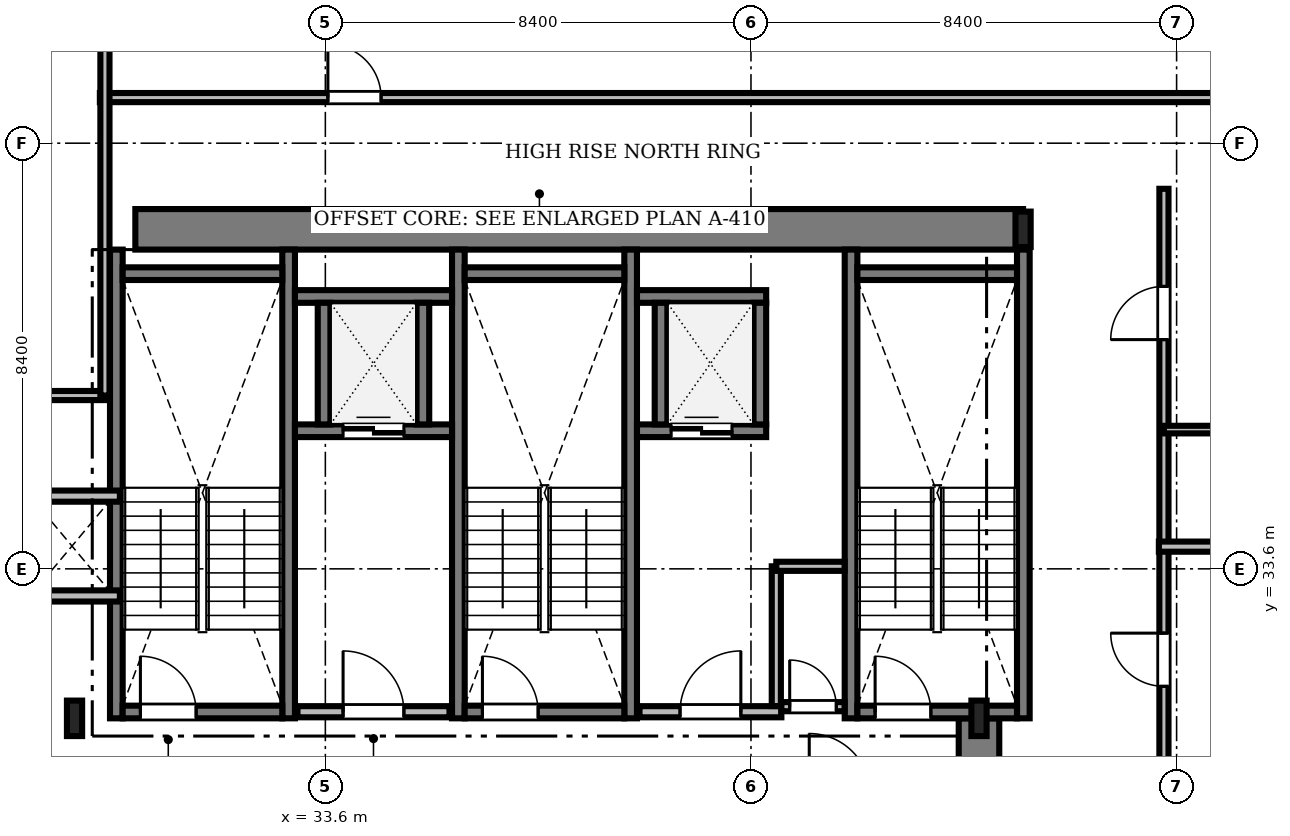
"""IFC4 building model, lengths in metres.
Left out: names, types, materials, properties, quantities, classifications, styles, units other than length and angle.
Written with IfcOpenShell. Run it as: python <this file> out.ifc"""

import sys

from ifc_helpers import new_model, si_unit, direction, frame, frame_2d, origin, origin_2d, place, context, subcontext, project, spatial, rectangle, i_section, extrude, source, transform, mapped, element, fill, save


model = new_model("IFC4")
c1 = context("Model", 3, precision=1e-05, world=origin(), true_north=direction((0.0, 1.0)))
c2 = subcontext(c1, "Body", "Model", "MODEL_VIEW")
j1 = project(units=[si_unit("LENGTHUNIT", "METRE"), si_unit("PLANEANGLEUNIT", "RADIAN")], contexts=[c1])
p1 = place(None, origin())
s1 = spatial("IfcSite", under=j1, at=p1, CompositionType="ELEMENT")
p2 = place(p1, origin())
s2 = spatial("IfcBuilding", under=s1, at=p2, CompositionType="ELEMENT")
p3 = place(p2, frame((0.0, 0.0, 177.2)))
s3 = spatial("IfcBuildingStorey", under=s2, at=p3, CompositionType="ELEMENT", Elevation=177.2)
m1 = source(origin(), c2, "Body", "SweptSolid", [
    extrude(rectangle(XDim=17.52, YDim=0.8, at=frame_2d((8.76, 0.0))), origin(), (0.0, 0.0, 1.0), 3.58),
])
p4 = place(p3, frame((29.85, 40.3, 0.0), z_axis=(0.0, 0.0, 1.0), x_axis=(1.0, 0.0, 0.0)))
e1 = element("IfcWall", 1, at=p4, inside=s3, PredefinedType="SHEAR", context=c2, shape_type="MappedRepresentation", body=[
    mapped(m1, transform((0.0, 0.0, 0.0), scale=1.0)),
])
m2 = source(origin(), c2, "Body", "SweptSolid", [
    extrude(rectangle(XDim=13.15, YDim=0.8, at=frame_2d((6.575, 0.0))), origin(), (0.0, 0.0, 1.0), 3.58),
])
p5 = place(p3, frame((46.5, 17.5, 0.0), z_axis=(0.0, 0.0, 1.0), x_axis=(0.0, 1.0, 0.0)))
e2 = element("IfcWall", 2, at=p5, inside=s3, PredefinedType="SHEAR", context=c2, shape_type="MappedRepresentation", body=[
    mapped(m2, transform((0.0, 0.0, 0.0), scale=1.0)),
])
m3 = source(origin(), c2, "Body", "SweptSolid", [
    extrude(i_section(OverallWidth=0.3, OverallDepth=0.7, WebThickness=0.017, FlangeThickness=0.032, FilletRadius=0.027, at=origin_2d()), origin(), (0.0, 0.0, 1.0), 3.58),
])
for number, where, z_axis, x_axis in (
    (3, (28.65, 30.65, 0.0), (0.0, 0.0, 1.0), (1.0, 0.0, 0.0)),
    (4, (46.5, 30.65, 0.0), (0.0, 0.0, 1.0), (1.0, 0.0, 0.0)),
    (5, (47.37, 40.3, 0.0), (0.0, 0.0, 1.0), (1.0, 0.0, 0.0)),
):
    element("IfcColumn", number, at=place(p3, frame(where, z_axis=z_axis, x_axis=x_axis)), inside=s3, PredefinedType="COLUMN", context=c2, shape_type="MappedRepresentation", body=[
        mapped(m3, transform((0.0, 0.0, 0.0), scale=1.0)),
    ])
m4 = source(origin(), c2, "Body", "SweptSolid", [
    extrude(rectangle(XDim=9.25, YDim=0.25, at=frame_2d((4.625, 0.0))), origin(), (0.0, 0.0, 1.0), 3.6),
])
for number, where, z_axis, x_axis in (
    (6, (29.475, 30.65, 0.0), (0.0, 0.0, 1.0), (0.0, 1.0, 0.0)),
    (7, (32.875, 30.65, 0.0), (0.0, 0.0, 1.0), (0.0, 1.0, 0.0)),
):
    element("IfcWall", number, at=place(p3, frame(where, z_axis=z_axis, x_axis=x_axis)), inside=s3, PredefinedType="SOLIDWALL", context=c2, shape_type="MappedRepresentation", body=[
        mapped(m4, transform((0.0, 0.0, 0.0), scale=1.0)),
    ])
m5 = source(origin(), c2, "Body", "SweptSolid", [
    extrude(rectangle(XDim=3.15, YDim=0.25, at=frame_2d((1.575, 0.0))), origin(), (0.0, 0.0, 1.0), 3.6),
])
p6 = place(p3, frame((29.6, 39.425, 0.0), z_axis=(0.0, 0.0, 1.0), x_axis=(1.0, 0.0, 0.0)))
e8 = element("IfcWall", 8, at=p6, inside=s3, PredefinedType="SOLIDWALL", context=c2, shape_type="MappedRepresentation", body=[
    mapped(m5, transform((0.0, 0.0, 0.0), scale=1.0)),
])
p7 = place(p3, frame((29.6, 30.775, 0.0), z_axis=(0.0, 0.0, 1.0), x_axis=(1.0, 0.0, 0.0)))
e9 = element("IfcWall", 9, at=p7, inside=s3, PredefinedType="SOLIDWALL", context=c2, shape_type="MappedRepresentation", body=[
    mapped(m5, transform((0.0, 0.0, 0.0), scale=1.0)),
])
m6 = source(origin(), c2, "Body", "SweptSolid", [
    extrude(rectangle(XDim=1.1, YDim=2.2, at=frame_2d((0.55, 1.1))), frame((0.0, 0.135, 0.0), z_axis=(0.0, -1.0, 0.0), x_axis=(1.0, 0.0, 0.0)), (0.0, 0.0, 1.0), 0.27),
])
p8 = place(p7, frame((0.35, 0.0, 0.0)))
e10 = element("IfcOpeningElement", 10, at=p8, cuts=e9, PredefinedType="OPENING", context=c2, shape_type="MappedRepresentation", body=[
    mapped(m6, transform((0.0, 0.0, 0.0), scale=1.0)),
])
for number, where, z_axis, x_axis in (
    (11, (36.225, 30.65, 0.0), (0.0, 0.0, 1.0), (0.0, 1.0, 0.0)),
    (12, (39.625, 30.65, 0.0), (0.0, 0.0, 1.0), (0.0, 1.0, 0.0)),
):
    element("IfcWall", number, at=place(p3, frame(where, z_axis=z_axis, x_axis=x_axis)), inside=s3, PredefinedType="SOLIDWALL", context=c2, shape_type="MappedRepresentation", body=[
        mapped(m4, transform((0.0, 0.0, 0.0), scale=1.0)),
    ])
p9 = place(p3, frame((36.35, 39.425, 0.0), z_axis=(0.0, 0.0, 1.0), x_axis=(1.0, 0.0, 0.0)))
e13 = element("IfcWall", 13, at=p9, inside=s3, PredefinedType="SOLIDWALL", context=c2, shape_type="MappedRepresentation", body=[
    mapped(m5, transform((0.0, 0.0, 0.0), scale=1.0)),
])
p10 = place(p3, frame((36.35, 30.775, 0.0), z_axis=(0.0, 0.0, 1.0), x_axis=(1.0, 0.0, 0.0)))
e14 = element("IfcWall", 14, at=p10, inside=s3, PredefinedType="SOLIDWALL", context=c2, shape_type="MappedRepresentation", body=[
    mapped(m5, transform((0.0, 0.0, 0.0), scale=1.0)),
])
p11 = place(p10, frame((0.35, 0.0, 0.0)))
e15 = element("IfcOpeningElement", 15, at=p11, cuts=e14, PredefinedType="OPENING", context=c2, shape_type="MappedRepresentation", body=[
    mapped(m6, transform((0.0, 0.0, 0.0), scale=1.0)),
])
for number, where, z_axis, x_axis in (
    (16, (43.975, 30.65, 0.0), (0.0, 0.0, 1.0), (0.0, 1.0, 0.0)),
    (17, (47.375, 30.65, 0.0), (0.0, 0.0, 1.0), (0.0, 1.0, 0.0)),
):
    element("IfcWall", number, at=place(p3, frame(where, z_axis=z_axis, x_axis=x_axis)), inside=s3, PredefinedType="SOLIDWALL", context=c2, shape_type="MappedRepresentation", body=[
        mapped(m4, transform((0.0, 0.0, 0.0), scale=1.0)),
    ])
p12 = place(p3, frame((44.1, 39.425, 0.0), z_axis=(0.0, 0.0, 1.0), x_axis=(1.0, 0.0, 0.0)))
e18 = element("IfcWall", 18, at=p12, inside=s3, PredefinedType="SOLIDWALL", context=c2, shape_type="MappedRepresentation", body=[
    mapped(m5, transform((0.0, 0.0, 0.0), scale=1.0)),
])
p13 = place(p3, frame((44.1, 30.775, 0.0), z_axis=(0.0, 0.0, 1.0), x_axis=(1.0, 0.0, 0.0)))
e19 = element("IfcWall", 19, at=p13, inside=s3, PredefinedType="SOLIDWALL", context=c2, shape_type="MappedRepresentation", body=[
    mapped(m5, transform((0.0, 0.0, 0.0), scale=1.0)),
])
p14 = place(p13, frame((0.35, 0.0, 0.0)))
e20 = element("IfcOpeningElement", 20, at=p14, cuts=e19, PredefinedType="OPENING", context=c2, shape_type="MappedRepresentation", body=[
    mapped(m6, transform((0.0, 0.0, 0.0), scale=1.0)),
])
m7 = source(origin(), c2, "Body", "SweptSolid", [
    extrude(rectangle(XDim=3.0, YDim=0.22, at=frame_2d((1.5, 0.0))), origin(), (0.0, 0.0, 1.0), 3.58),
])
p15 = place(p3, frame((33.05, 30.78, 0.0), z_axis=(0.0, 0.0, 1.0), x_axis=(1.0, 0.0, 0.0)))
e21 = element("IfcWall", 21, at=p15, inside=s3, PredefinedType="SOLIDWALL", context=c2, shape_type="MappedRepresentation", body=[
    mapped(m7, transform((0.0, 0.0, 0.0), scale=1.0)),
])
m8 = source(origin(), c2, "Body", "SweptSolid", [
    extrude(rectangle(XDim=1.2, YDim=2.2, at=frame_2d((0.6, 1.1))), frame((0.0, 0.12, 0.0), z_axis=(0.0, -1.0, 0.0), x_axis=(1.0, 0.0, 0.0)), (0.0, 0.0, 1.0), 0.24),
])
p16 = place(p15, frame((0.9, 0.0, 0.0)))
e22 = element("IfcOpeningElement", 22, at=p16, cuts=e21, PredefinedType="OPENING", context=c2, shape_type="MappedRepresentation", body=[
    mapped(m8, transform((0.0, 0.0, 0.0), scale=1.0)),
])
m9 = source(origin(), c2, "Body", "SweptSolid", [
    extrude(rectangle(XDim=2.8, YDim=0.22, at=frame_2d((1.4, 0.0))), origin(), (0.0, 0.0, 1.0), 3.58),
])
p17 = place(p3, frame((39.8, 30.78, 0.0), z_axis=(0.0, 0.0, 1.0), x_axis=(1.0, 0.0, 0.0)))
e23 = element("IfcWall", 23, at=p17, inside=s3, PredefinedType="SOLIDWALL", context=c2, shape_type="MappedRepresentation", body=[
    mapped(m9, transform((0.0, 0.0, 0.0), scale=1.0)),
])
p18 = place(p17, frame((0.8, 0.0, 0.0)))
e24 = element("IfcOpeningElement", 24, at=p18, cuts=e23, PredefinedType="OPENING", context=c2, shape_type="MappedRepresentation", body=[
    mapped(m8, transform((0.0, 0.0, 0.0), scale=1.0)),
])
m10 = source(origin(), c2, "Body", "SweptSolid", [
    extrude(rectangle(XDim=1.89, YDim=0.22, at=frame_2d((0.945, 0.0))), origin(), (0.0, 0.0, 1.0), 3.58),
])
for number, where, z_axis, x_axis in (
    (25, (27.655, 33.065, 0.0), (0.0, 0.0, 1.0), (1.0, 0.0, 0.0)),
    (26, (27.655, 35.035, 0.0), (0.0, 0.0, 1.0), (1.0, 0.0, 0.0)),
):
    element("IfcWall", number, at=place(p3, frame(where, z_axis=z_axis, x_axis=x_axis)), inside=s3, PredefinedType="SOLIDWALL", context=c2, shape_type="MappedRepresentation", body=[
        mapped(m10, transform((0.0, 0.0, 0.0), scale=1.0)),
    ])
m11 = source(origin(), c2, "Body", "SweptSolid", [
    extrude(rectangle(XDim=3.1, YDim=0.25, at=frame_2d((1.55, 0.0))), origin(), (0.0, 0.0, 1.0), 3.58),
])
p19 = place(p3, frame((33.0, 36.325, 0.0), z_axis=(0.0, 0.0, 1.0), x_axis=(1.0, 0.0, 0.0)))
e27 = element("IfcWall", 27, at=p19, inside=s3, PredefinedType="SOLIDWALL", context=c2, shape_type="MappedRepresentation", body=[
    mapped(m11, transform((0.0, 0.0, 0.0), scale=1.0)),
])
m12 = source(origin(), c2, "Body", "SweptSolid", [
    extrude(rectangle(XDim=1.2, YDim=2.25, at=frame_2d((0.6, 1.125))), frame((0.0, 0.135, 0.0), z_axis=(0.0, -1.0, 0.0), x_axis=(1.0, 0.0, 0.0)), (0.0, 0.0, 1.0), 0.27),
])
p20 = place(p19, frame((0.95, 0.0, 0.0)))
e28 = element("IfcOpeningElement", 28, at=p20, cuts=e27, PredefinedType="OPENING", context=c2, shape_type="MappedRepresentation", body=[
    mapped(m12, transform((0.0, 0.0, 0.0), scale=1.0)),
])
p21 = place(p3, frame((33.0, 38.975, 0.0), z_axis=(0.0, 0.0, 1.0), x_axis=(1.0, 0.0, 0.0)))
e29 = element("IfcWall", 29, at=p21, inside=s3, PredefinedType="SOLIDWALL", context=c2, shape_type="MappedRepresentation", body=[
    mapped(m11, transform((0.0, 0.0, 0.0), scale=1.0)),
])
m13 = source(origin(), c2, "Body", "SweptSolid", [
    extrude(rectangle(XDim=2.4, YDim=0.25, at=frame_2d((1.2, 0.0))), origin(), (0.0, 0.0, 1.0), 3.58),
])
for number, where, z_axis, x_axis in (
    (30, (33.575, 36.45, 0.0), (0.0, 0.0, 1.0), (0.0, 1.0, 0.0)),
    (31, (35.525, 36.45, 0.0), (0.0, 0.0, 1.0), (0.0, 1.0, 0.0)),
):
    element("IfcWall", number, at=place(p3, frame(where, z_axis=z_axis, x_axis=x_axis)), inside=s3, PredefinedType="SOLIDWALL", context=c2, shape_type="MappedRepresentation", body=[
        mapped(m13, transform((0.0, 0.0, 0.0), scale=1.0)),
    ])
m14 = source(origin(), c2, "Body", "SweptSolid", [
    extrude(rectangle(XDim=2.55, YDim=0.25, at=frame_2d((1.275, 0.0))), origin(), (0.0, 0.0, 1.0), 3.58),
])
p22 = place(p3, frame((39.75, 36.325, 0.0), z_axis=(0.0, 0.0, 1.0), x_axis=(1.0, 0.0, 0.0)))
e32 = element("IfcWall", 32, at=p22, inside=s3, PredefinedType="SOLIDWALL", context=c2, shape_type="MappedRepresentation", body=[
    mapped(m14, transform((0.0, 0.0, 0.0), scale=1.0)),
])
p23 = place(p22, frame((0.675, 0.0, 0.0)))
e33 = element("IfcOpeningElement", 33, at=p23, cuts=e32, PredefinedType="OPENING", context=c2, shape_type="MappedRepresentation", body=[
    mapped(m12, transform((0.0, 0.0, 0.0), scale=1.0)),
])
p24 = place(p3, frame((39.75, 38.975, 0.0), z_axis=(0.0, 0.0, 1.0), x_axis=(1.0, 0.0, 0.0)))
e34 = element("IfcWall", 34, at=p24, inside=s3, PredefinedType="SOLIDWALL", context=c2, shape_type="MappedRepresentation", body=[
    mapped(m14, transform((0.0, 0.0, 0.0), scale=1.0)),
])
for number, where, z_axis, x_axis in (
    (35, (40.225, 36.45, 0.0), (0.0, 0.0, 1.0), (0.0, 1.0, 0.0)),
    (36, (42.175, 36.45, 0.0), (0.0, 0.0, 1.0), (0.0, 1.0, 0.0)),
):
    element("IfcWall", number, at=place(p3, frame(where, z_axis=z_axis, x_axis=x_axis)), inside=s3, PredefinedType="SOLIDWALL", context=c2, shape_type="MappedRepresentation", body=[
        mapped(m13, transform((0.0, 0.0, 0.0), scale=1.0)),
    ])
m15 = source(origin(), c2, "Body", "SweptSolid", [
    extrude(rectangle(XDim=28.428, YDim=0.18, at=frame_2d((14.214, 0.0))), origin(), (0.0, 0.0, 1.0), 2.822),
])
p25 = place(p3, frame((29.15, 42.9, 0.0), z_axis=(0.0, 0.0, 1.0), x_axis=(1.0, 0.0, 0.0)))
e37 = element("IfcWall", 37, at=p25, inside=s3, PredefinedType="PARTITIONING", context=c2, shape_type="MappedRepresentation", body=[
    mapped(m15, transform((0.0, 0.0, 0.0), scale=1.0)),
])
m16 = source(origin(), c2, "Body", "SweptSolid", [
    extrude(rectangle(XDim=1.05, YDim=2.2, at=frame_2d((0.525, 1.1))), frame((0.0, 0.1, 0.0), z_axis=(0.0, -1.0, 0.0), x_axis=(1.0, 0.0, 0.0)), (0.0, 0.0, 1.0), 0.2),
])
p26 = place(p25, frame((4.5, 0.0, 0.0)))
e38 = element("IfcOpeningElement", 38, at=p26, cuts=e37, PredefinedType="OPENING", context=c2, shape_type="MappedRepresentation", body=[
    mapped(m16, transform((0.0, 0.0, 0.0), scale=1.0)),
])
m17 = source(origin(), c2, "Body", "SweptSolid", [
    extrude(rectangle(XDim=27.59, YDim=0.18, at=frame_2d((13.795, 0.0))), origin(), (0.0, 0.0, 1.0), 3.022),
])
p27 = place(p3, frame((50.15, 13.51, 0.0), z_axis=(0.0, 0.0, 1.0), x_axis=(0.0, 1.0, 0.0)))
e39 = element("IfcWall", 39, at=p27, inside=s3, PredefinedType="PARTITIONING", context=c2, shape_type="MappedRepresentation", body=[
    mapped(m17, transform((0.0, 0.0, 0.0), scale=1.0)),
])
p28 = place(p27, frame((4.086, 0.0, 0.0)))
e40 = element("IfcOpeningElement", 40, at=p28, cuts=e39, PredefinedType="OPENING", context=c2, shape_type="MappedRepresentation", body=[
    mapped(m16, transform((0.0, 0.0, 0.0), scale=1.0)),
])
p29 = place(p27, frame((9.744, 0.0, 0.0)))
e41 = element("IfcOpeningElement", 41, at=p29, cuts=e39, PredefinedType="OPENING", context=c2, shape_type="MappedRepresentation", body=[
    mapped(m16, transform((0.0, 0.0, 0.0), scale=1.0)),
])
p30 = place(p27, frame((17.771, 0.0, 0.0)))
e42 = element("IfcOpeningElement", 42, at=p30, cuts=e39, PredefinedType="OPENING", context=c2, shape_type="MappedRepresentation", body=[
    mapped(m16, transform((0.0, 0.0, 0.0), scale=1.0)),
])
p31 = place(p27, frame((24.614, 0.0, 0.0)))
e43 = element("IfcOpeningElement", 43, at=p31, cuts=e39, PredefinedType="OPENING", context=c2, shape_type="MappedRepresentation", body=[
    mapped(m16, transform((0.0, 0.0, 0.0), scale=1.0)),
])
m18 = source(origin(), c2, "Body", "SweptSolid", [
    extrude(rectangle(XDim=17.828, YDim=0.18, at=frame_2d((8.914, 0.0))), origin(), (0.0, 0.0, 1.0), 2.822),
])
p32 = place(p3, frame((11.422, 37.02, 0.0), z_axis=(0.0, 0.0, 1.0), x_axis=(1.0, 0.0, 0.0)))
e44 = element("IfcWall", 44, at=p32, inside=s3, PredefinedType="PARTITIONING", context=c2, shape_type="MappedRepresentation", body=[
    mapped(m18, transform((0.0, 0.0, 0.0), scale=1.0)),
])
p33 = place(p32, frame((10.778, 0.0, 0.0)))
e45 = element("IfcOpeningElement", 45, at=p33, cuts=e44, PredefinedType="OPENING", context=c2, shape_type="MappedRepresentation", body=[
    mapped(m16, transform((0.0, 0.0, 0.0), scale=1.0)),
])
m19 = source(origin(), c2, "Body", "SweptSolid", [
    extrude(rectangle(XDim=1.248, YDim=0.18, at=frame_2d((0.624, 0.0))), origin(), (0.0, 0.0, 1.0), 3.58),
])
p34 = place(p3, frame((42.6, 30.88, 0.0), z_axis=(0.0, 0.0, 1.0), x_axis=(1.0, 0.0, 0.0)))
e46 = element("IfcWall", 46, at=p34, inside=s3, PredefinedType="PARTITIONING", context=c2, shape_type="MappedRepresentation", body=[
    mapped(m19, transform((0.0, 0.0, 0.0), scale=1.0)),
])
m20 = source(origin(), c2, "Body", "SweptSolid", [
    extrude(rectangle(XDim=0.92, YDim=2.1, at=frame_2d((0.46, 1.05))), frame((0.0, 0.1, 0.0), z_axis=(0.0, -1.0, 0.0), x_axis=(1.0, 0.0, 0.0)), (0.0, 0.0, 1.0), 0.2),
])
p35 = place(p34, frame((0.164, 0.0, 0.0)))
e47 = element("IfcOpeningElement", 47, at=p35, cuts=e46, PredefinedType="OPENING", context=c2, shape_type="MappedRepresentation", body=[
    mapped(m20, transform((0.0, 0.0, 0.0), scale=1.0)),
])
m21 = source(origin(), c2, "Body", "SweptSolid", [
    extrude(rectangle(XDim=11.258, YDim=0.18, at=frame_2d((5.629, 0.0))), origin(), (0.0, 0.0, 1.0), 2.822),
])
p36 = place(p3, frame((29.25, 37.02, 0.0), z_axis=(0.0, 0.0, 1.0), x_axis=(0.0, 1.0, 0.0)))
e48 = element("IfcWall", 48, at=p36, inside=s3, PredefinedType="PARTITIONING", context=c2, shape_type="MappedRepresentation", body=[
    mapped(m21, transform((0.0, 0.0, 0.0), scale=1.0)),
])
m22 = source(origin(), c2, "Body", "SweptSolid", [
    extrude(rectangle(XDim=7.528, YDim=0.2, at=frame_2d((3.764, 0.0))), origin(), (0.0, 0.0, 1.0), 2.822),
])
p37 = place(p3, frame((50.05, 34.038, 0.0), z_axis=(0.0, 0.0, 1.0), x_axis=(1.0, 0.0, 0.0)))
e49 = element("IfcWall", 49, at=p37, inside=s3, PredefinedType="PARTITIONING", context=c2, shape_type="MappedRepresentation", body=[
    mapped(m22, transform((0.0, 0.0, 0.0), scale=1.0)),
])
m23 = source(origin(), c2, "Body", "SweptSolid", [
    extrude(rectangle(XDim=2.758, YDim=0.18, at=frame_2d((1.379, 0.0))), origin(), (0.0, 0.0, 1.0), 3.58),
])
p38 = place(p3, frame((42.5, 30.892, 0.0), z_axis=(0.0, 0.0, 1.0), x_axis=(0.0, 1.0, 0.0)))
e50 = element("IfcWall", 50, at=p38, inside=s3, PredefinedType="PARTITIONING", context=c2, shape_type="MappedRepresentation", body=[
    mapped(m23, transform((0.0, 0.0, 0.0), scale=1.0)),
])
m24 = source(origin(), c2, "Body", "SweptSolid", [
    extrude(rectangle(XDim=2.36, YDim=0.15, at=frame_2d((1.18, 0.0))), origin(), (0.0, 0.0, 1.0), 3.58),
])
p39 = place(p3, frame((50.15, 36.348, 0.0), z_axis=(0.0, 0.0, 1.0), x_axis=(1.0, 0.0, 0.0)))
e51 = element("IfcWall", 51, at=p39, inside=s3, PredefinedType="PARTITIONING", context=c2, shape_type="MappedRepresentation", body=[
    mapped(m24, transform((0.0, 0.0, 0.0), scale=1.0)),
])
m25 = source(origin(), c2, "Body", "SweptSolid", [
    extrude(rectangle(XDim=1.348, YDim=0.18, at=frame_2d((0.674, 0.0))), origin(), (0.0, 0.0, 1.0), 3.58),
])
p40 = place(p3, frame((42.5, 33.65, 0.0), z_axis=(0.0, 0.0, 1.0), x_axis=(1.0, 0.0, 0.0)))
e52 = element("IfcWall", 52, at=p40, inside=s3, PredefinedType="PARTITIONING", context=c2, shape_type="MappedRepresentation", body=[
    mapped(m25, transform((0.0, 0.0, 0.0), scale=1.0)),
])
m26 = source(origin(), c2, "Body", "SweptSolid", [
    extrude(rectangle(XDim=1.1, YDim=2.2, at=frame_2d((0.55, 1.1))), frame((0.0, 0.025, 0.0), z_axis=(0.0, -1.0, 0.0), x_axis=(1.0, 0.0, 0.0)), (0.0, 0.0, 1.0), 0.05),
])
p41 = place(p8, origin())
e53 = element("IfcDoor", 53, at=p41, inside=s3, OperationType="SINGLE_SWING_LEFT", PredefinedType="DOOR", context=c2, shape_type="MappedRepresentation", body=[
    mapped(m26, transform((0.0, 0.0, 0.0), scale=1.0)),
])
fill(e10, e53)
p42 = place(p11, origin())
e54 = element("IfcDoor", 54, at=p42, inside=s3, OperationType="SINGLE_SWING_LEFT", PredefinedType="DOOR", context=c2, shape_type="MappedRepresentation", body=[
    mapped(m26, transform((0.0, 0.0, 0.0), scale=1.0)),
])
fill(e15, e54)
p43 = place(p14, origin())
e55 = element("IfcDoor", 55, at=p43, inside=s3, OperationType="SINGLE_SWING_LEFT", PredefinedType="DOOR", context=c2, shape_type="MappedRepresentation", body=[
    mapped(m26, transform((0.0, 0.0, 0.0), scale=1.0)),
])
fill(e20, e55)
m27 = source(origin(), c2, "Body", "SweptSolid", [
    extrude(rectangle(XDim=1.2, YDim=2.2, at=frame_2d((0.6, 1.1))), frame((0.0, 0.025, 0.0), z_axis=(0.0, -1.0, 0.0), x_axis=(1.0, 0.0, 0.0)), (0.0, 0.0, 1.0), 0.05),
])
p44 = place(p16, origin())
e56 = element("IfcDoor", 56, at=p44, inside=s3, OperationType="SINGLE_SWING_LEFT", PredefinedType="DOOR", context=c2, shape_type="MappedRepresentation", body=[
    mapped(m27, transform((0.0, 0.0, 0.0), scale=1.0)),
])
fill(e22, e56)
p45 = place(p18, origin())
e57 = element("IfcDoor", 57, at=p45, inside=s3, OperationType="SINGLE_SWING_RIGHT", PredefinedType="DOOR", context=c2, shape_type="MappedRepresentation", body=[
    mapped(m27, transform((0.0, 0.0, 0.0), scale=1.0)),
])
fill(e24, e57)
m28 = source(origin(), c2, "Body", "SweptSolid", [
    extrude(rectangle(XDim=1.2, YDim=2.25, at=frame_2d((0.6, 1.125))), frame((0.0, 0.025, 0.0), z_axis=(0.0, -1.0, 0.0), x_axis=(1.0, 0.0, 0.0)), (0.0, 0.0, 1.0), 0.05),
])
p46 = place(p20, origin())
e58 = element("IfcDoor", 58, at=p46, inside=s3, OperationType="DOUBLE_DOOR_SLIDING", PredefinedType="DOOR", context=c2, shape_type="MappedRepresentation", body=[
    mapped(m28, transform((0.0, 0.0, 0.0), scale=1.0)),
])
fill(e28, e58)
p47 = place(p23, origin())
e59 = element("IfcDoor", 59, at=p47, inside=s3, OperationType="DOUBLE_DOOR_SLIDING", PredefinedType="DOOR", context=c2, shape_type="MappedRepresentation", body=[
    mapped(m28, transform((0.0, 0.0, 0.0), scale=1.0)),
])
fill(e33, e59)
m29 = source(origin(), c2, "Body", "SweptSolid", [
    extrude(rectangle(XDim=1.05, YDim=2.2, at=frame_2d((0.525, 1.1))), frame((0.0, 0.025, 0.0), z_axis=(0.0, -1.0, 0.0), x_axis=(1.0, 0.0, 0.0)), (0.0, 0.0, 1.0), 0.05),
])
p48 = place(p26, origin())
e60 = element("IfcDoor", 60, at=p48, inside=s3, OperationType="SINGLE_SWING_LEFT", PredefinedType="DOOR", context=c2, shape_type="MappedRepresentation", body=[
    mapped(m29, transform((0.0, 0.0, 0.0), scale=1.0)),
])
fill(e38, e60)
p49 = place(p30, origin())
e61 = element("IfcDoor", 61, at=p49, inside=s3, OperationType="SINGLE_SWING_RIGHT", PredefinedType="DOOR", context=c2, shape_type="MappedRepresentation", body=[
    mapped(m29, transform((0.0, 0.0, 0.0), scale=1.0)),
])
fill(e42, e61)
p50 = place(p31, origin())
e62 = element("IfcDoor", 62, at=p50, inside=s3, OperationType="SINGLE_SWING_LEFT", PredefinedType="DOOR", context=c2, shape_type="MappedRepresentation", body=[
    mapped(m29, transform((0.0, 0.0, 0.0), scale=1.0)),
])
fill(e43, e62)
m30 = source(origin(), c2, "Body", "SweptSolid", [
    extrude(rectangle(XDim=0.92, YDim=2.1, at=frame_2d((0.46, 1.05))), frame((0.0, 0.025, 0.0), z_axis=(0.0, -1.0, 0.0), x_axis=(1.0, 0.0, 0.0)), (0.0, 0.0, 1.0), 0.05),
])
p51 = place(p35, origin())
e63 = element("IfcDoor", 63, at=p51, inside=s3, OperationType="SINGLE_SWING_LEFT", PredefinedType="DOOR", context=c2, shape_type="MappedRepresentation", body=[
    mapped(m30, transform((0.0, 0.0, 0.0), scale=1.0)),
])
fill(e47, e63)
save(model, sys.argv[1])
